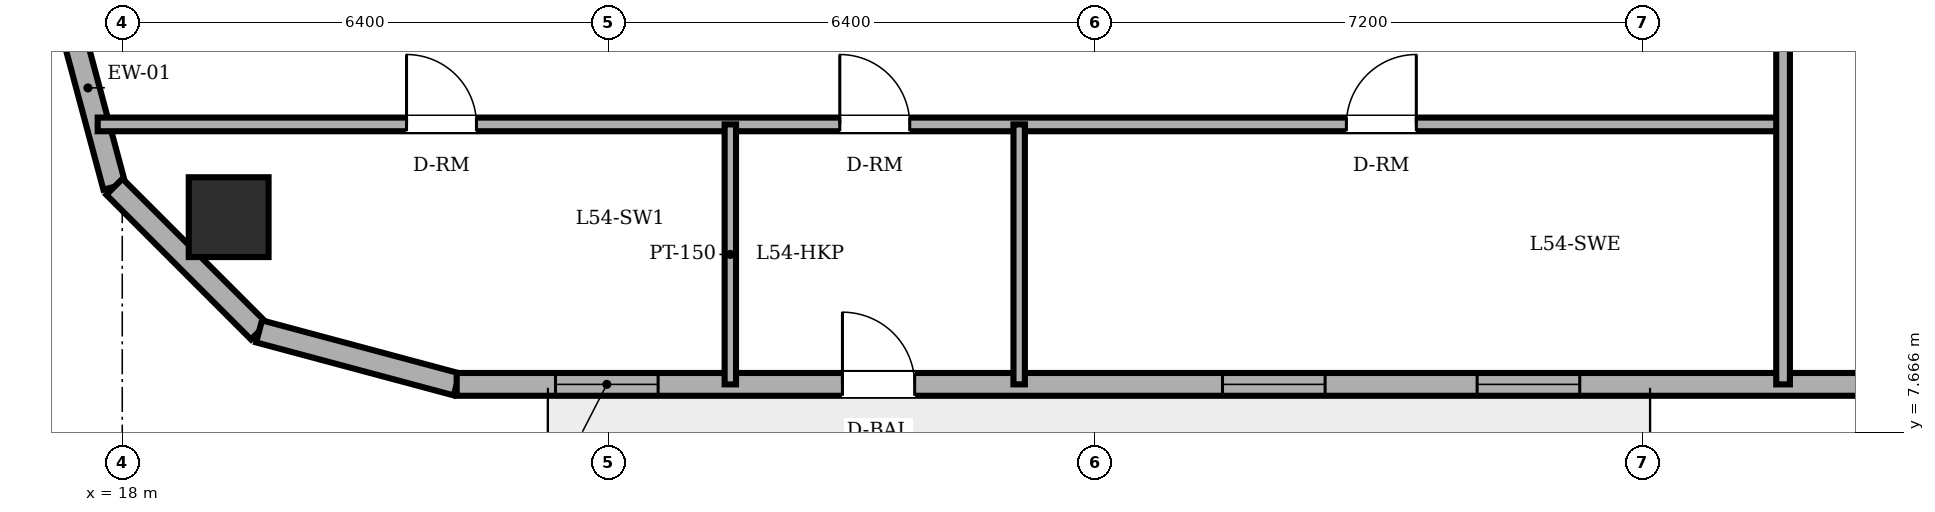
"""IFC4 building model, lengths in metres.
Left out: names, types, materials, properties, quantities, classifications, styles, units other than length and angle.
Written with IfcOpenShell. Run it as: python <this file> out.ifc"""

import sys

from ifc_helpers import new_model, si_unit, direction, frame, frame_2d, origin, origin_2d, place, context, subcontext, project, spatial, rectangle, circle, extrude, element, fill, save


model = new_model("IFC4")
c1 = context("Model", 3, precision=1e-05, world=origin(), true_north=direction((0.0, 1.0)))
c2 = subcontext(c1, "Body", "Model", "MODEL_VIEW")
j1 = project(units=[si_unit("LENGTHUNIT", "METRE"), si_unit("PLANEANGLEUNIT", "RADIAN")], contexts=[c1])
p1 = place(None, origin())
s1 = spatial("IfcSite", under=j1, at=p1, CompositionType="ELEMENT")
p2 = place(p1, origin())
s2 = spatial("IfcBuilding", under=s1, at=p2, CompositionType="ELEMENT")
p3 = place(p2, frame((0.0, 0.0, 208.5)))
s3 = spatial("IfcBuildingStorey", under=s2, at=p3, CompositionType="ELEMENT", Elevation=208.5)
p4 = place(p3, frame((19.4, 10.5, 0.0), z_axis=(0.0, 0.0, 1.0), x_axis=(1.0, 0.0, 0.0)))
e1 = element("IfcColumn", 1, at=p4, inside=s3, PredefinedType="COLUMN", context=c2, shape_type="SweptSolid", body=[
    extrude(circle(Radius=0.525, at=origin_2d()), origin(), (0.0, 0.0, 1.0), 3.6),
])
p5 = place(p3, frame((17.2, 13.5, 0.0), z_axis=(0.0, 0.0, 1.0), x_axis=(0.258932525951, -0.965895412042, 0.0)))
e2 = element("IfcWall", 2, at=p5, inside=s3, PredefinedType="SOLIDWALL", context=c2, shape_type="SweptSolid", body=[
    extrude(rectangle(XDim=2.692, YDim=0.3, at=frame_2d((1.346, 0.0))), origin(), (0.0, 0.0, 1.0), 3.4),
])
p6 = place(p3, frame((17.897, 10.9, 0.0), z_axis=(0.0, 0.0, 1.0), x_axis=(0.707152139074, -0.70706142039, 0.0)))
e3 = element("IfcWall", 3, at=p6, inside=s3, PredefinedType="SOLIDWALL", context=c2, shape_type="SweptSolid", body=[
    extrude(rectangle(XDim=2.691, YDim=0.3, at=frame_2d((1.346, 0.0))), origin(), (0.0, 0.0, 1.0), 3.4),
])
p7 = place(p3, frame((19.8, 8.997, 0.0), z_axis=(0.0, 0.0, 1.0), x_axis=(0.965889330541, -0.258955210695, 0.0)))
e4 = element("IfcWall", 4, at=p7, inside=s3, PredefinedType="SOLIDWALL", context=c2, shape_type="SweptSolid", body=[
    extrude(rectangle(XDim=2.692, YDim=0.3, at=frame_2d((1.346, 0.0))), origin(), (0.0, 0.0, 1.0), 3.4),
])
p8 = place(p3, frame((22.4, 8.3, 0.0), z_axis=(0.0, 0.0, 1.0), x_axis=(1.0, 0.0, 0.0)))
e5 = element("IfcWall", 5, at=p8, inside=s3, PredefinedType="SOLIDWALL", context=c2, shape_type="SweptSolid", body=[
    extrude(rectangle(XDim=32.485, YDim=0.3, at=frame_2d((16.243, 0.0))), origin(), (0.0, 0.0, 1.0), 3.4),
])
p9 = place(p8, frame((5.075, 0.0, 0.0)))
e6 = element("IfcOpeningElement", 6, at=p9, cuts=e5, PredefinedType="OPENING", context=c2, shape_type="SweptSolid", body=[
    extrude(rectangle(XDim=0.95, YDim=2.2, at=frame_2d((0.475, 1.1))), frame((0.0, 0.16, 0.0), z_axis=(0.0, -1.0, 0.0), x_axis=(1.0, 0.0, 0.0)), (0.0, 0.0, 1.0), 0.32),
])
p10 = place(p8, frame((1.3, 0.0, 0.85)))
e7 = element("IfcOpeningElement", 7, at=p10, cuts=e5, PredefinedType="OPENING", context=c2, shape_type="SweptSolid", body=[
    extrude(rectangle(XDim=1.35, YDim=1.55, at=frame_2d((0.675, 0.775))), frame((0.0, 0.16, 0.0), z_axis=(0.0, -1.0, 0.0), x_axis=(1.0, 0.0, 0.0)), (0.0, 0.0, 1.0), 0.32),
])
p11 = place(p8, frame((10.075, 0.0, 0.85)))
e8 = element("IfcOpeningElement", 8, at=p11, cuts=e5, PredefinedType="OPENING", context=c2, shape_type="SweptSolid", body=[
    extrude(rectangle(XDim=1.35, YDim=1.55, at=frame_2d((0.675, 0.775))), frame((0.0, 0.16, 0.0), z_axis=(0.0, -1.0, 0.0), x_axis=(1.0, 0.0, 0.0)), (0.0, 0.0, 1.0), 0.32),
])
p12 = place(p8, frame((13.425, 0.0, 0.85)))
e9 = element("IfcOpeningElement", 9, at=p12, cuts=e5, PredefinedType="OPENING", context=c2, shape_type="SweptSolid", body=[
    extrude(rectangle(XDim=1.35, YDim=1.55, at=frame_2d((0.675, 0.775))), frame((0.0, 0.16, 0.0), z_axis=(0.0, -1.0, 0.0), x_axis=(1.0, 0.0, 0.0)), (0.0, 0.0, 1.0), 0.32),
])
p13 = place(p8, frame((19.386, 0.0, 0.85)))
e10 = element("IfcOpeningElement", 10, at=p13, cuts=e5, PredefinedType="OPENING", context=c2, shape_type="SweptSolid", body=[
    extrude(rectangle(XDim=1.35, YDim=1.55, at=frame_2d((0.675, 0.775))), frame((0.0, 0.16, 0.0), z_axis=(0.0, -1.0, 0.0), x_axis=(1.0, 0.0, 0.0)), (0.0, 0.0, 1.0), 0.32),
])
p14 = place(p8, frame((21.996, 0.0, 0.85)))
e11 = element("IfcOpeningElement", 11, at=p14, cuts=e5, PredefinedType="OPENING", context=c2, shape_type="SweptSolid", body=[
    extrude(rectangle(XDim=1.35, YDim=1.55, at=frame_2d((0.675, 0.775))), frame((0.0, 0.16, 0.0), z_axis=(0.0, -1.0, 0.0), x_axis=(1.0, 0.0, 0.0)), (0.0, 0.0, 1.0), 0.32),
])
p15 = place(p8, frame((26.891, 0.0, 0.85)))
e12 = element("IfcOpeningElement", 12, at=p15, cuts=e5, PredefinedType="OPENING", context=c2, shape_type="SweptSolid", body=[
    extrude(rectangle(XDim=1.35, YDim=1.55, at=frame_2d((0.675, 0.775))), frame((0.0, 0.16, 0.0), z_axis=(0.0, -1.0, 0.0), x_axis=(1.0, 0.0, 0.0)), (0.0, 0.0, 1.0), 0.32),
])
p16 = place(p8, frame((29.176, 0.0, 0.85)))
e13 = element("IfcOpeningElement", 13, at=p16, cuts=e5, PredefinedType="OPENING", context=c2, shape_type="SweptSolid", body=[
    extrude(rectangle(XDim=1.35, YDim=1.55, at=frame_2d((0.675, 0.775))), frame((0.0, 0.16, 0.0), z_axis=(0.0, -1.0, 0.0), x_axis=(1.0, 0.0, 0.0)), (0.0, 0.0, 1.0), 0.32),
])
p17 = place(p3, frame((17.677, 11.72, 0.0), z_axis=(0.0, 0.0, 1.0), x_axis=(1.0, 0.0, 0.0)))
e14 = element("IfcWall", 14, at=p17, inside=s3, PredefinedType="PARTITIONING", context=c2, shape_type="SweptSolid", body=[
    extrude(rectangle(XDim=22.173, YDim=0.18, at=frame_2d((11.086, 0.0))), origin(), (0.0, 0.0, 1.0), 3.4),
])
p18 = place(p17, frame((9.763, 0.0, 0.0)))
e15 = element("IfcOpeningElement", 15, at=p18, cuts=e14, PredefinedType="OPENING", context=c2, shape_type="SweptSolid", body=[
    extrude(rectangle(XDim=0.92, YDim=2.1, at=frame_2d((0.46, 1.05))), frame((0.0, 0.1, 0.0), z_axis=(0.0, -1.0, 0.0), x_axis=(1.0, 0.0, 0.0)), (0.0, 0.0, 1.0), 0.2),
])
p19 = place(p17, frame((4.063, 0.0, 0.0)))
e16 = element("IfcOpeningElement", 16, at=p19, cuts=e14, PredefinedType="OPENING", context=c2, shape_type="SweptSolid", body=[
    extrude(rectangle(XDim=0.92, YDim=2.1, at=frame_2d((0.46, 1.05))), frame((0.0, 0.1, 0.0), z_axis=(0.0, -1.0, 0.0), x_axis=(1.0, 0.0, 0.0)), (0.0, 0.0, 1.0), 0.2),
])
p20 = place(p17, frame((16.428, 0.0, 0.0)))
e17 = element("IfcOpeningElement", 17, at=p20, cuts=e14, PredefinedType="OPENING", context=c2, shape_type="SweptSolid", body=[
    extrude(rectangle(XDim=0.92, YDim=2.1, at=frame_2d((0.46, 1.05))), frame((0.0, 0.1, 0.0), z_axis=(0.0, -1.0, 0.0), x_axis=(1.0, 0.0, 0.0)), (0.0, 0.0, 1.0), 0.2),
])
for number, where, z_axis, x_axis in (
    (18, (26.0, 8.3, 0.0), (0.0, 0.0, 1.0), (0.0, 1.0, 0.0)),
    (19, (29.8, 8.3, 0.0), (0.0, 0.0, 1.0), (0.0, 1.0, 0.0)),
):
    element("IfcWall", number, at=place(p3, frame(where, z_axis=z_axis, x_axis=x_axis)), inside=s3, PredefinedType="PARTITIONING", context=c2, shape_type="SweptSolid", body=[
        extrude(rectangle(XDim=3.42, YDim=0.15, at=frame_2d((1.71, 0.0))), origin(), (0.0, 0.0, 1.0), 3.4),
    ])
p21 = place(p3, frame((39.85, 8.3, 0.0), z_axis=(0.0, 0.0, 1.0), x_axis=(0.0, 1.0, 0.0)))
e20 = element("IfcWall", 20, at=p21, inside=s3, PredefinedType="PARTITIONING", context=c2, shape_type="SweptSolid", body=[
    extrude(rectangle(XDim=14.52, YDim=0.18, at=frame_2d((7.26, 0.0))), origin(), (0.0, 0.0, 1.0), 3.4),
])
p22 = place(p21, frame((8.25, 0.0, 0.0)))
e21 = element("IfcOpeningElement", 21, at=p22, cuts=e20, PredefinedType="OPENING", context=c2, shape_type="SweptSolid", body=[
    extrude(rectangle(XDim=0.92, YDim=2.1, at=frame_2d((0.46, 1.05))), frame((0.0, 0.1, 0.0), z_axis=(0.0, -1.0, 0.0), x_axis=(1.0, 0.0, 0.0)), (0.0, 0.0, 1.0), 0.2),
])
p23 = place(p9, origin())
e22 = element("IfcDoor", 22, at=p23, inside=s3, OperationType="SINGLE_SWING_LEFT", PredefinedType="DOOR", context=c2, shape_type="SweptSolid", body=[
    extrude(rectangle(XDim=0.95, YDim=2.2, at=frame_2d((0.475, 1.1))), frame((0.0, 0.025, 0.0), z_axis=(0.0, -1.0, 0.0), x_axis=(1.0, 0.0, 0.0)), (0.0, 0.0, 1.0), 0.05),
])
fill(e6, e22)
p24 = place(p10, origin())
e23 = element("IfcWindow", 23, at=p24, inside=s3, PartitioningType="SINGLE_PANEL", PredefinedType="WINDOW", context=c2, shape_type="SweptSolid", body=[
    extrude(rectangle(XDim=1.35, YDim=1.55, at=frame_2d((0.675, 0.775))), frame((0.0, 0.03, 0.0), z_axis=(0.0, -1.0, 0.0), x_axis=(1.0, 0.0, 0.0)), (0.0, 0.0, 1.0), 0.06),
])
fill(e7, e23)
p25 = place(p11, origin())
e24 = element("IfcWindow", 24, at=p25, inside=s3, PartitioningType="SINGLE_PANEL", PredefinedType="WINDOW", context=c2, shape_type="SweptSolid", body=[
    extrude(rectangle(XDim=1.35, YDim=1.55, at=frame_2d((0.675, 0.775))), frame((0.0, 0.03, 0.0), z_axis=(0.0, -1.0, 0.0), x_axis=(1.0, 0.0, 0.0)), (0.0, 0.0, 1.0), 0.06),
])
fill(e8, e24)
p26 = place(p12, origin())
e25 = element("IfcWindow", 25, at=p26, inside=s3, PartitioningType="SINGLE_PANEL", PredefinedType="WINDOW", context=c2, shape_type="SweptSolid", body=[
    extrude(rectangle(XDim=1.35, YDim=1.55, at=frame_2d((0.675, 0.775))), frame((0.0, 0.03, 0.0), z_axis=(0.0, -1.0, 0.0), x_axis=(1.0, 0.0, 0.0)), (0.0, 0.0, 1.0), 0.06),
])
fill(e9, e25)
p27 = place(p18, origin())
e26 = element("IfcDoor", 26, at=p27, inside=s3, OperationType="SINGLE_SWING_LEFT", PredefinedType="DOOR", context=c2, shape_type="SweptSolid", body=[
    extrude(rectangle(XDim=0.92, YDim=2.1, at=frame_2d((0.46, 1.05))), frame((0.0, 0.025, 0.0), z_axis=(0.0, -1.0, 0.0), x_axis=(1.0, 0.0, 0.0)), (0.0, 0.0, 1.0), 0.05),
])
fill(e15, e26)
p28 = place(p19, origin())
e27 = element("IfcDoor", 27, at=p28, inside=s3, OperationType="SINGLE_SWING_LEFT", PredefinedType="DOOR", context=c2, shape_type="SweptSolid", body=[
    extrude(rectangle(XDim=0.92, YDim=2.1, at=frame_2d((0.46, 1.05))), frame((0.0, 0.025, 0.0), z_axis=(0.0, -1.0, 0.0), x_axis=(1.0, 0.0, 0.0)), (0.0, 0.0, 1.0), 0.05),
])
fill(e16, e27)
p29 = place(p20, origin())
e28 = element("IfcDoor", 28, at=p29, inside=s3, OperationType="SINGLE_SWING_RIGHT", PredefinedType="DOOR", context=c2, shape_type="SweptSolid", body=[
    extrude(rectangle(XDim=0.92, YDim=2.1, at=frame_2d((0.46, 1.05))), frame((0.0, 0.025, 0.0), z_axis=(0.0, -1.0, 0.0), x_axis=(1.0, 0.0, 0.0)), (0.0, 0.0, 1.0), 0.05),
])
fill(e17, e28)
save(model, sys.argv[1])
